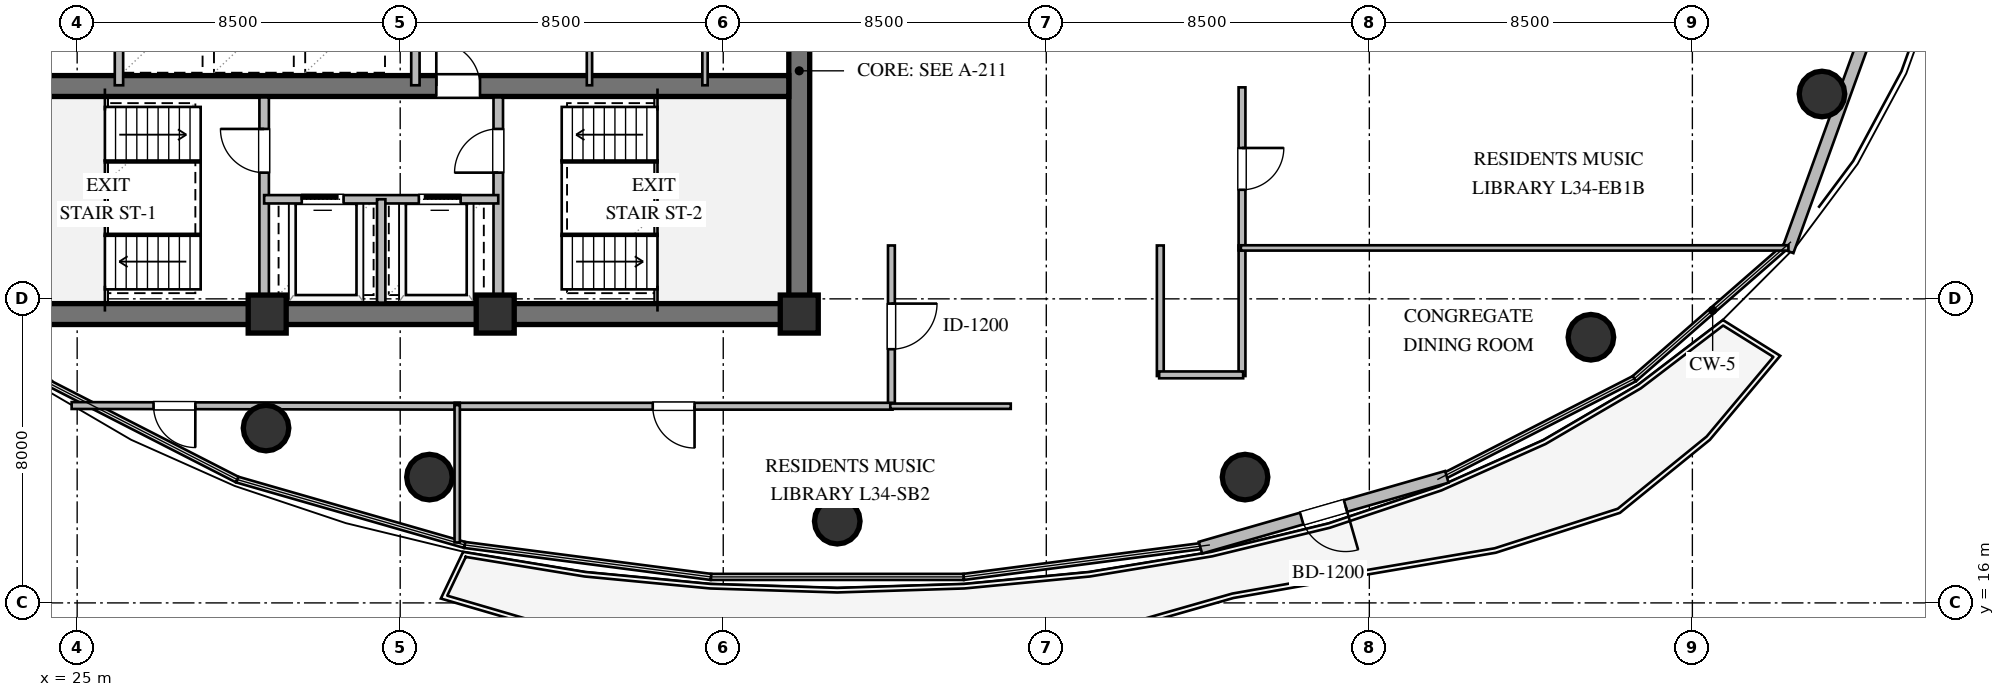
"""IFC4 building model, lengths in metres.
Left out: names, types, materials, properties, quantities, classifications, styles, units other than length and angle.
Written with IfcOpenShell. Run it as: python <this file> out.ifc"""

import sys

from ifc_helpers import new_model, si_unit, direction, frame, frame_2d, origin, origin_2d, place, context, subcontext, project, spatial, rectangle, circle, extrude, element, fill, save


model = new_model("IFC4")
c1 = context("Model", 3, precision=1e-05, world=origin(), true_north=direction((0.0, 1.0)))
c2 = subcontext(c1, "Body", "Model", "MODEL_VIEW")
j1 = project(units=[si_unit("LENGTHUNIT", "METRE"), si_unit("PLANEANGLEUNIT", "RADIAN")], contexts=[c1])
p1 = place(None, origin())
s1 = spatial("IfcSite", under=j1, at=p1, CompositionType="ELEMENT")
p2 = place(p1, origin())
s2 = spatial("IfcBuilding", under=s1, at=p2, CompositionType="ELEMENT")
p3 = place(p2, frame((0.0, 0.0, 131.4)))
s3 = spatial("IfcBuildingStorey", under=s2, at=p3, CompositionType="ELEMENT", Elevation=131.4)
p4 = place(p3, frame((21.725, 23.6, 0.0), z_axis=(0.0, 0.0, 1.0), x_axis=(1.0, 0.0, 0.0)))
e1 = element("IfcWall", 1, at=p4, inside=s3, PredefinedType="SHEAR", context=c2, shape_type="SweptSolid", body=[
    extrude(rectangle(XDim=22.55, YDim=0.55, at=frame_2d((11.275, 0.0))), origin(), (0.0, 0.0, 1.0), 3.36),
])
p5 = place(p3, frame((44.0, 23.875, 0.0), z_axis=(0.0, 0.0, 1.0), x_axis=(0.0, 1.0, 0.0)))
e2 = element("IfcWall", 2, at=p5, inside=s3, PredefinedType="SHEAR", context=c2, shape_type="SweptSolid", body=[
    extrude(rectangle(XDim=12.25, YDim=0.55, at=frame_2d((6.125, 0.0))), origin(), (0.0, 0.0, 1.0), 3.36),
])
p6 = place(p5, frame((8.725, 0.0, 0.0)))
e3 = element("IfcOpeningElement", 3, at=p6, cuts=e2, PredefinedType="OPENING", context=c2, shape_type="SweptSolid", body=[
    extrude(rectangle(XDim=1.5, YDim=2.15, at=frame_2d((0.75, 1.075))), frame((0.0, 0.285, 0.0), z_axis=(0.0, -1.0, 0.0), x_axis=(1.0, 0.0, 0.0)), (0.0, 0.0, 1.0), 0.57),
])
p7 = place(p3, frame((22.275, 29.6, 0.0), z_axis=(0.0, 0.0, 1.0), x_axis=(1.0, 0.0, 0.0)))
e4 = element("IfcWall", 4, at=p7, inside=s3, PredefinedType="SHEAR", context=c2, shape_type="SweptSolid", body=[
    extrude(rectangle(XDim=21.45, YDim=0.55, at=frame_2d((10.725, 0.0))), origin(), (0.0, 0.0, 1.0), 3.36),
])
p8 = place(p7, frame((12.175, 0.0, 0.0)))
e5 = element("IfcOpeningElement", 5, at=p8, cuts=e4, PredefinedType="OPENING", context=c2, shape_type="SweptSolid", body=[
    extrude(rectangle(XDim=1.15, YDim=2.1, at=frame_2d((0.575, 1.05))), frame((0.0, 0.285, 0.0), z_axis=(0.0, -1.0, 0.0), x_axis=(1.0, 0.0, 0.0)), (0.0, 0.0, 1.0), 0.57),
])
for number, where, z_axis, x_axis in (
    (6, (30.0, 23.6, 0.0), (0.0, 0.0, 1.0), (1.0, 0.0, 0.0)),
    (7, (36.0, 23.6, 0.0), (0.0, 0.0, 1.0), (1.0, 0.0, 0.0)),
    (8, (44.0, 23.6, 0.0), (0.0, 0.0, 1.0), (1.0, 0.0, 0.0)),
):
    element("IfcColumn", number, at=place(p3, frame(where, z_axis=z_axis, x_axis=x_axis)), inside=s3, PredefinedType="COLUMN", context=c2, shape_type="SweptSolid", body=[
        extrude(rectangle(XDim=1.0, YDim=1.0, at=origin_2d()), origin(), (0.0, 0.0, 1.0), 3.6),
    ])
for number, where, z_axis, x_axis in (
    (9, (29.97, 20.6, 0.0), (0.0, 0.0, 1.0), (1.0, 0.0, 0.0)),
    (10, (34.27, 19.31, 0.0), (0.0, 0.0, 1.0), (1.0, 0.0, 0.0)),
    (11, (45.0, 18.15, 0.0), (0.0, 0.0, 1.0), (1.0, 0.0, 0.0)),
    (12, (55.73, 19.31, 0.0), (0.0, 0.0, 1.0), (1.0, 0.0, 0.0)),
    (13, (64.83, 22.99, 0.0), (0.0, 0.0, 1.0), (1.0, 0.0, 0.0)),
    (14, (70.91, 29.39, 0.0), (0.0, 0.0, 1.0), (1.0, 0.0, 0.0)),
):
    element("IfcColumn", number, at=place(p3, frame(where, z_axis=z_axis, x_axis=x_axis)), inside=s3, PredefinedType="COLUMN", context=c2, shape_type="SweptSolid", body=[
        extrude(circle(Radius=0.6, at=origin_2d()), origin(), (0.0, 0.0, 1.0), 3.6),
    ])
p9 = place(p3, frame((74.708, 38.244, 0.0), z_axis=(0.0, 0.0, 1.0), x_axis=(-0.340324669139, -0.94030799187, 0.0)))
e15 = element("IfcWall", 15, at=p9, inside=s3, PredefinedType="STANDARD", context=c2, shape_type="SweptSolid", body=[
    extrude(rectangle(XDim=13.81, YDim=0.32, at=frame_2d((6.905, 0.0))), origin(), (0.0, 0.0, 1.0), 3.36),
])
p10 = place(p3, frame((61.039, 19.317, 0.0), z_axis=(0.0, 0.0, 1.0), x_axis=(-0.96106509915, -0.276322049784, 0.0)))
e16 = element("IfcWall", 16, at=p10, inside=s3, PredefinedType="STANDARD", context=c2, shape_type="SweptSolid", body=[
    extrude(rectangle(XDim=6.746, YDim=0.32, at=frame_2d((3.373, 0.0))), origin(), (0.0, 0.0, 1.0), 3.36),
])
p11 = place(p10, frame((2.773, 0.0, 0.0)))
e17 = element("IfcOpeningElement", 17, at=p11, cuts=e16, PredefinedType="OPENING", context=c2, shape_type="SweptSolid", body=[
    extrude(rectangle(XDim=1.2, YDim=2.15, at=frame_2d((0.6, 1.075))), frame((0.0, 0.17, 0.0), z_axis=(0.0, -1.0, 0.0), x_axis=(1.0, 0.0, 0.0)), (0.0, 0.0, 1.0), 0.34),
])
p12 = place(p3, frame((29.92, 23.9, 0.0), z_axis=(0.0, 0.0, 1.0), x_axis=(0.0, 1.0, 0.0)))
e18 = element("IfcWall", 18, at=p12, inside=s3, PredefinedType="SOLIDWALL", context=c2, shape_type="SweptSolid", body=[
    extrude(rectangle(XDim=5.4, YDim=0.25, at=frame_2d((2.7, 0.0))), origin(), (0.0, 0.0, 1.0), 2.806),
])
p13 = place(p12, frame((3.421, 0.0, 0.0)))
e19 = element("IfcOpeningElement", 19, at=p13, cuts=e18, PredefinedType="OPENING", context=c2, shape_type="SweptSolid", body=[
    extrude(rectangle(XDim=1.15, YDim=2.1, at=frame_2d((0.575, 1.05))), frame((0.0, 0.135, 0.0), z_axis=(0.0, -1.0, 0.0), x_axis=(1.0, 0.0, 0.0)), (0.0, 0.0, 1.0), 0.27),
])
p14 = place(p3, frame((36.08, 23.9, 0.0), z_axis=(0.0, 0.0, 1.0), x_axis=(0.0, 1.0, 0.0)))
e20 = element("IfcWall", 20, at=p14, inside=s3, PredefinedType="SOLIDWALL", context=c2, shape_type="SweptSolid", body=[
    extrude(rectangle(XDim=5.4, YDim=0.25, at=frame_2d((2.7, 0.0))), origin(), (0.0, 0.0, 1.0), 3.36),
])
p15 = place(p14, frame((3.421, 0.0, 0.0)))
e21 = element("IfcOpeningElement", 21, at=p15, cuts=e20, PredefinedType="OPENING", context=c2, shape_type="SweptSolid", body=[
    extrude(rectangle(XDim=1.15, YDim=2.1, at=frame_2d((0.575, 1.05))), frame((0.0, 0.135, 0.0), z_axis=(0.0, -1.0, 0.0), x_axis=(1.0, 0.0, 0.0)), (0.0, 0.0, 1.0), 0.27),
])
p16 = place(p3, frame((29.92, 26.62, 0.0), z_axis=(0.0, 0.0, 1.0), x_axis=(1.0, 0.0, 0.0)))
e22 = element("IfcWall", 22, at=p16, inside=s3, PredefinedType="SOLIDWALL", context=c2, shape_type="SweptSolid", body=[
    extrude(rectangle(XDim=6.16, YDim=0.22, at=frame_2d((3.08, 0.0))), origin(), (0.0, 0.0, 1.0), 3.36),
])
p17 = place(p16, frame((0.99, 0.0, 0.0)))
e23 = element("IfcOpeningElement", 23, at=p17, cuts=e22, PredefinedType="OPENING", context=c2, shape_type="SweptSolid", body=[
    extrude(rectangle(XDim=1.1, YDim=2.1, at=frame_2d((0.55, 1.05))), frame((0.0, 0.12, 0.0), z_axis=(0.0, -1.0, 0.0), x_axis=(1.0, 0.0, 0.0)), (0.0, 0.0, 1.0), 0.24),
])
p18 = place(p16, frame((4.07, 0.0, 0.0)))
e24 = element("IfcOpeningElement", 24, at=p18, cuts=e22, PredefinedType="OPENING", context=c2, shape_type="SweptSolid", body=[
    extrude(rectangle(XDim=1.1, YDim=2.1, at=frame_2d((0.55, 1.05))), frame((0.0, 0.12, 0.0), z_axis=(0.0, -1.0, 0.0), x_axis=(1.0, 0.0, 0.0)), (0.0, 0.0, 1.0), 0.24),
])
p19 = place(p3, frame((33.0, 23.9, 0.0), z_axis=(0.0, 0.0, 1.0), x_axis=(0.0, 1.0, 0.0)))
e25 = element("IfcWall", 25, at=p19, inside=s3, PredefinedType="SOLIDWALL", context=c2, shape_type="SweptSolid", body=[
    extrude(rectangle(XDim=2.72, YDim=0.22, at=frame_2d((1.36, 0.0))), origin(), (0.0, 0.0, 1.0), 3.36),
])
for number, where, z_axis, x_axis in (
    (26, (26.1, 29.62, 0.0), (0.0, 0.0, 1.0), (0.0, 1.0, 0.0)),
    (27, (33.9, 29.62, 0.0), (0.0, 0.0, 1.0), (0.0, 1.0, 0.0)),
):
    element("IfcWall", number, at=place(p3, frame(where, z_axis=z_axis, x_axis=x_axis)), inside=s3, PredefinedType="SOLIDWALL", context=c2, shape_type="SweptSolid", body=[
        extrude(rectangle(XDim=2.36, YDim=0.22, at=frame_2d((1.18, 0.0))), origin(), (0.0, 0.0, 1.0), 3.36),
    ])
for number, where, z_axis, x_axis in (
    (28, (38.48, 29.62, 0.0), (0.0, 0.0, 1.0), (0.0, 1.0, 0.0)),
    (29, (41.52, 29.62, 0.0), (0.0, 0.0, 1.0), (0.0, 1.0, 0.0)),
):
    element("IfcWall", number, at=place(p3, frame(where, z_axis=z_axis, x_axis=x_axis)), inside=s3, PredefinedType="PARTITIONING", context=c2, shape_type="SweptSolid", body=[
        extrude(rectangle(XDim=2.36, YDim=0.14, at=frame_2d((1.18, 0.0))), origin(), (0.0, 0.0, 1.0), 3.36),
    ])
p20 = place(p3, frame((46.425, 25.405, 0.0), z_axis=(0.0, 0.0, 1.0), x_axis=(0.0, -1.0, 0.0)))
e30 = element("IfcWall", 30, at=p20, inside=s3, PredefinedType="PARTITIONING", context=c2, shape_type="SweptSolid", body=[
    extrude(rectangle(XDim=4.26, YDim=0.18, at=frame_2d((2.13, 0.0))), origin(), (0.0, 0.0, 1.0), 3.36),
])
p21 = place(p20, frame((1.53, 0.0, 0.0)))
e31 = element("IfcOpeningElement", 31, at=p21, cuts=e30, PredefinedType="OPENING", context=c2, shape_type="SweptSolid", body=[
    extrude(rectangle(XDim=1.2, YDim=2.15, at=frame_2d((0.6, 1.075))), frame((0.0, 0.1, 0.0), z_axis=(0.0, -1.0, 0.0), x_axis=(1.0, 0.0, 0.0)), (0.0, 0.0, 1.0), 0.2),
])
for number, where, z_axis, x_axis in (
    (32, (55.65, 25.405, 0.0), (0.0, 0.0, 1.0), (0.0, -1.0, 0.0)),
    (33, (53.5, 21.97, 0.0), (0.0, 0.0, 1.0), (0.0, 1.0, 0.0)),
):
    element("IfcWall", number, at=place(p3, frame(where, z_axis=z_axis, x_axis=x_axis)), inside=s3, PredefinedType="PARTITIONING", context=c2, shape_type="SweptSolid", body=[
        extrude(rectangle(XDim=3.435, YDim=0.18, at=frame_2d((1.718, 0.0))), origin(), (0.0, 0.0, 1.0), 3.36),
    ])
p22 = place(p3, frame((55.68, 22.0, 0.0), z_axis=(0.0, 0.0, 1.0), x_axis=(-1.0, 0.0, 0.0)))
e34 = element("IfcWall", 34, at=p22, inside=s3, PredefinedType="PARTITIONING", context=c2, shape_type="SweptSolid", body=[
    extrude(rectangle(XDim=2.21, YDim=0.18, at=frame_2d((1.105, 0.0))), origin(), (0.0, 0.0, 1.0), 3.36),
])
p23 = place(p3, frame((55.65, 29.565, 0.0), z_axis=(0.0, 0.0, 1.0), x_axis=(0.0, -1.0, 0.0)))
e35 = element("IfcWall", 35, at=p23, inside=s3, PredefinedType="PARTITIONING", context=c2, shape_type="SweptSolid", body=[
    extrude(rectangle(XDim=4.29, YDim=0.18, at=frame_2d((2.145, 0.0))), origin(), (0.0, 0.0, 1.0), 3.36),
])
p24 = place(p23, frame((1.595, 0.0, 0.0)))
e36 = element("IfcOpeningElement", 36, at=p24, cuts=e35, PredefinedType="OPENING", context=c2, shape_type="SweptSolid", body=[
    extrude(rectangle(XDim=1.1, YDim=2.1, at=frame_2d((0.55, 1.05))), frame((0.0, 0.1, 0.0), z_axis=(0.0, -1.0, 0.0), x_axis=(1.0, 0.0, 0.0)), (0.0, 0.0, 1.0), 0.2),
])
p25 = place(p3, frame((35.065, 21.175, 0.0), z_axis=(0.0, 0.0, 1.0), x_axis=(-0.999998434459, 0.001769485513, 0.0)))
e37 = element("IfcWall", 37, at=p25, inside=s3, PredefinedType="PARTITIONING", context=c2, shape_type="SweptSolid", body=[
    extrude(rectangle(XDim=10.21, YDim=0.18, at=frame_2d((5.105, 0.0))), origin(), (0.0, 0.0, 1.0), 2.657),
])
p26 = place(p25, frame((6.955, 0.0, 0.0)))
e38 = element("IfcOpeningElement", 38, at=p26, cuts=e37, PredefinedType="OPENING", context=c2, shape_type="SweptSolid", body=[
    extrude(rectangle(XDim=1.1, YDim=2.1, at=frame_2d((0.55, 1.05))), frame((0.0, 0.1, 0.0), z_axis=(0.0, -1.0, 0.0), x_axis=(1.0, 0.0, 0.0)), (0.0, 0.0, 1.0), 0.2),
])
p27 = place(p3, frame((46.455, 21.175, 0.0), z_axis=(0.0, 0.0, 1.0), x_axis=(-1.0, 0.0, 0.0)))
e39 = element("IfcWall", 39, at=p27, inside=s3, PredefinedType="PARTITIONING", context=c2, shape_type="SweptSolid", body=[
    extrude(rectangle(XDim=11.52, YDim=0.18, at=frame_2d((5.76, 0.0))), origin(), (0.0, 0.0, 1.0), 2.996),
])
p28 = place(p27, frame((5.21, 0.0, 0.0)))
e40 = element("IfcOpeningElement", 40, at=p28, cuts=e39, PredefinedType="OPENING", context=c2, shape_type="SweptSolid", body=[
    extrude(rectangle(XDim=1.1, YDim=2.1, at=frame_2d((0.55, 1.05))), frame((0.0, 0.1, 0.0), z_axis=(0.0, -1.0, 0.0), x_axis=(1.0, 0.0, 0.0)), (0.0, 0.0, 1.0), 0.2),
])
p29 = place(p3, frame((55.62, 25.34, 0.0), z_axis=(0.0, 0.0, 1.0), x_axis=(1.0, 0.0, 0.0)))
e41 = element("IfcWall", 41, at=p29, inside=s3, PredefinedType="PARTITIONING", context=c2, shape_type="SweptSolid", body=[
    extrude(rectangle(XDim=14.407, YDim=0.14, at=frame_2d((7.204, 0.0))), origin(), (0.0, 0.0, 1.0), 3.36),
])
p30 = place(p3, frame((49.565, 21.175, 0.0), z_axis=(0.0, 0.0, 1.0), x_axis=(-1.0, 0.0, 0.0)))
e42 = element("IfcWall", 42, at=p30, inside=s3, PredefinedType="PARTITIONING", context=c2, shape_type="SweptSolid", body=[
    extrude(rectangle(XDim=3.17, YDim=0.14, at=frame_2d((1.585, 0.0))), origin(), (0.0, 0.0, 1.0), 2.996),
])
p31 = place(p3, frame((35.0, 21.205, 0.0), z_axis=(0.0, 0.0, 1.0), x_axis=(0.0, -1.0, 0.0)))
e43 = element("IfcWall", 43, at=p31, inside=s3, PredefinedType="PARTITIONING", context=c2, shape_type="SweptSolid", body=[
    extrude(rectangle(XDim=3.614, YDim=0.14, at=frame_2d((1.807, 0.0))), origin(), (0.0, 0.0, 1.0), 3.36),
])
p32 = place(p11, origin())
e44 = element("IfcDoor", 44, at=p32, inside=s3, OperationType="SINGLE_SWING_LEFT", PredefinedType="DOOR", context=c2, shape_type="SweptSolid", body=[
    extrude(rectangle(XDim=1.2, YDim=2.15, at=frame_2d((0.6, 1.075))), frame((0.0, 0.025, 0.0), z_axis=(0.0, -1.0, 0.0), x_axis=(1.0, 0.0, 0.0)), (0.0, 0.0, 1.0), 0.05),
])
fill(e17, e44)
p33 = place(p13, origin())
e45 = element("IfcDoor", 45, at=p33, inside=s3, OperationType="SINGLE_SWING_RIGHT", PredefinedType="DOOR", context=c2, shape_type="SweptSolid", body=[
    extrude(rectangle(XDim=1.15, YDim=2.1, at=frame_2d((0.575, 1.05))), frame((0.0, 0.025, 0.0), z_axis=(0.0, -1.0, 0.0), x_axis=(1.0, 0.0, 0.0)), (0.0, 0.0, 1.0), 0.05),
])
fill(e19, e45)
p34 = place(p15, origin())
e46 = element("IfcDoor", 46, at=p34, inside=s3, OperationType="SINGLE_SWING_LEFT", PredefinedType="DOOR", context=c2, shape_type="SweptSolid", body=[
    extrude(rectangle(XDim=1.15, YDim=2.1, at=frame_2d((0.575, 1.05))), frame((0.0, 0.025, 0.0), z_axis=(0.0, -1.0, 0.0), x_axis=(1.0, 0.0, 0.0)), (0.0, 0.0, 1.0), 0.05),
])
fill(e21, e46)
p35 = place(p17, origin())
e47 = element("IfcDoor", 47, at=p35, inside=s3, OperationType="SLIDING_TO_LEFT", PredefinedType="DOOR", context=c2, shape_type="SweptSolid", body=[
    extrude(rectangle(XDim=1.1, YDim=2.1, at=frame_2d((0.55, 1.05))), frame((0.0, 0.025, 0.0), z_axis=(0.0, -1.0, 0.0), x_axis=(1.0, 0.0, 0.0)), (0.0, 0.0, 1.0), 0.05),
])
fill(e23, e47)
p36 = place(p18, origin())
e48 = element("IfcDoor", 48, at=p36, inside=s3, OperationType="SLIDING_TO_RIGHT", PredefinedType="DOOR", context=c2, shape_type="SweptSolid", body=[
    extrude(rectangle(XDim=1.1, YDim=2.1, at=frame_2d((0.55, 1.05))), frame((0.0, 0.025, 0.0), z_axis=(0.0, -1.0, 0.0), x_axis=(1.0, 0.0, 0.0)), (0.0, 0.0, 1.0), 0.05),
])
fill(e24, e48)
p37 = place(p8, origin())
e49 = element("IfcDoor", 49, at=p37, inside=s3, OperationType="SINGLE_SWING_LEFT", PredefinedType="DOOR", context=c2, shape_type="SweptSolid", body=[
    extrude(rectangle(XDim=1.15, YDim=2.1, at=frame_2d((0.575, 1.05))), frame((0.0, 0.025, 0.0), z_axis=(0.0, -1.0, 0.0), x_axis=(1.0, 0.0, 0.0)), (0.0, 0.0, 1.0), 0.05),
])
fill(e5, e49)
p38 = place(p21, origin())
e50 = element("IfcDoor", 50, at=p38, inside=s3, OperationType="SINGLE_SWING_LEFT", PredefinedType="DOOR", context=c2, shape_type="SweptSolid", body=[
    extrude(rectangle(XDim=1.2, YDim=2.15, at=frame_2d((0.6, 1.075))), frame((0.0, 0.025, 0.0), z_axis=(0.0, -1.0, 0.0), x_axis=(1.0, 0.0, 0.0)), (0.0, 0.0, 1.0), 0.05),
])
fill(e31, e50)
p39 = place(p24, origin())
e51 = element("IfcDoor", 51, at=p39, inside=s3, OperationType="SINGLE_SWING_LEFT", PredefinedType="DOOR", context=c2, shape_type="SweptSolid", body=[
    extrude(rectangle(XDim=1.1, YDim=2.1, at=frame_2d((0.55, 1.05))), frame((0.0, 0.025, 0.0), z_axis=(0.0, -1.0, 0.0), x_axis=(1.0, 0.0, 0.0)), (0.0, 0.0, 1.0), 0.05),
])
fill(e36, e51)
p40 = place(p26, origin())
e52 = element("IfcDoor", 52, at=p40, inside=s3, OperationType="SINGLE_SWING_LEFT", PredefinedType="DOOR", context=c2, shape_type="SweptSolid", body=[
    extrude(rectangle(XDim=1.1, YDim=2.1, at=frame_2d((0.55, 1.05))), frame((0.0, 0.025, 0.0), z_axis=(0.0, -1.0, 0.0), x_axis=(1.0, 0.0, 0.0)), (0.0, 0.0, 1.0), 0.05),
])
fill(e38, e52)
p41 = place(p28, origin())
e53 = element("IfcDoor", 53, at=p41, inside=s3, OperationType="SINGLE_SWING_LEFT", PredefinedType="DOOR", context=c2, shape_type="SweptSolid", body=[
    extrude(rectangle(XDim=1.1, YDim=2.1, at=frame_2d((0.55, 1.05))), frame((0.0, 0.025, 0.0), z_axis=(0.0, -1.0, 0.0), x_axis=(1.0, 0.0, 0.0)), (0.0, 0.0, 1.0), 0.05),
])
fill(e40, e53)
save(model, sys.argv[1])
